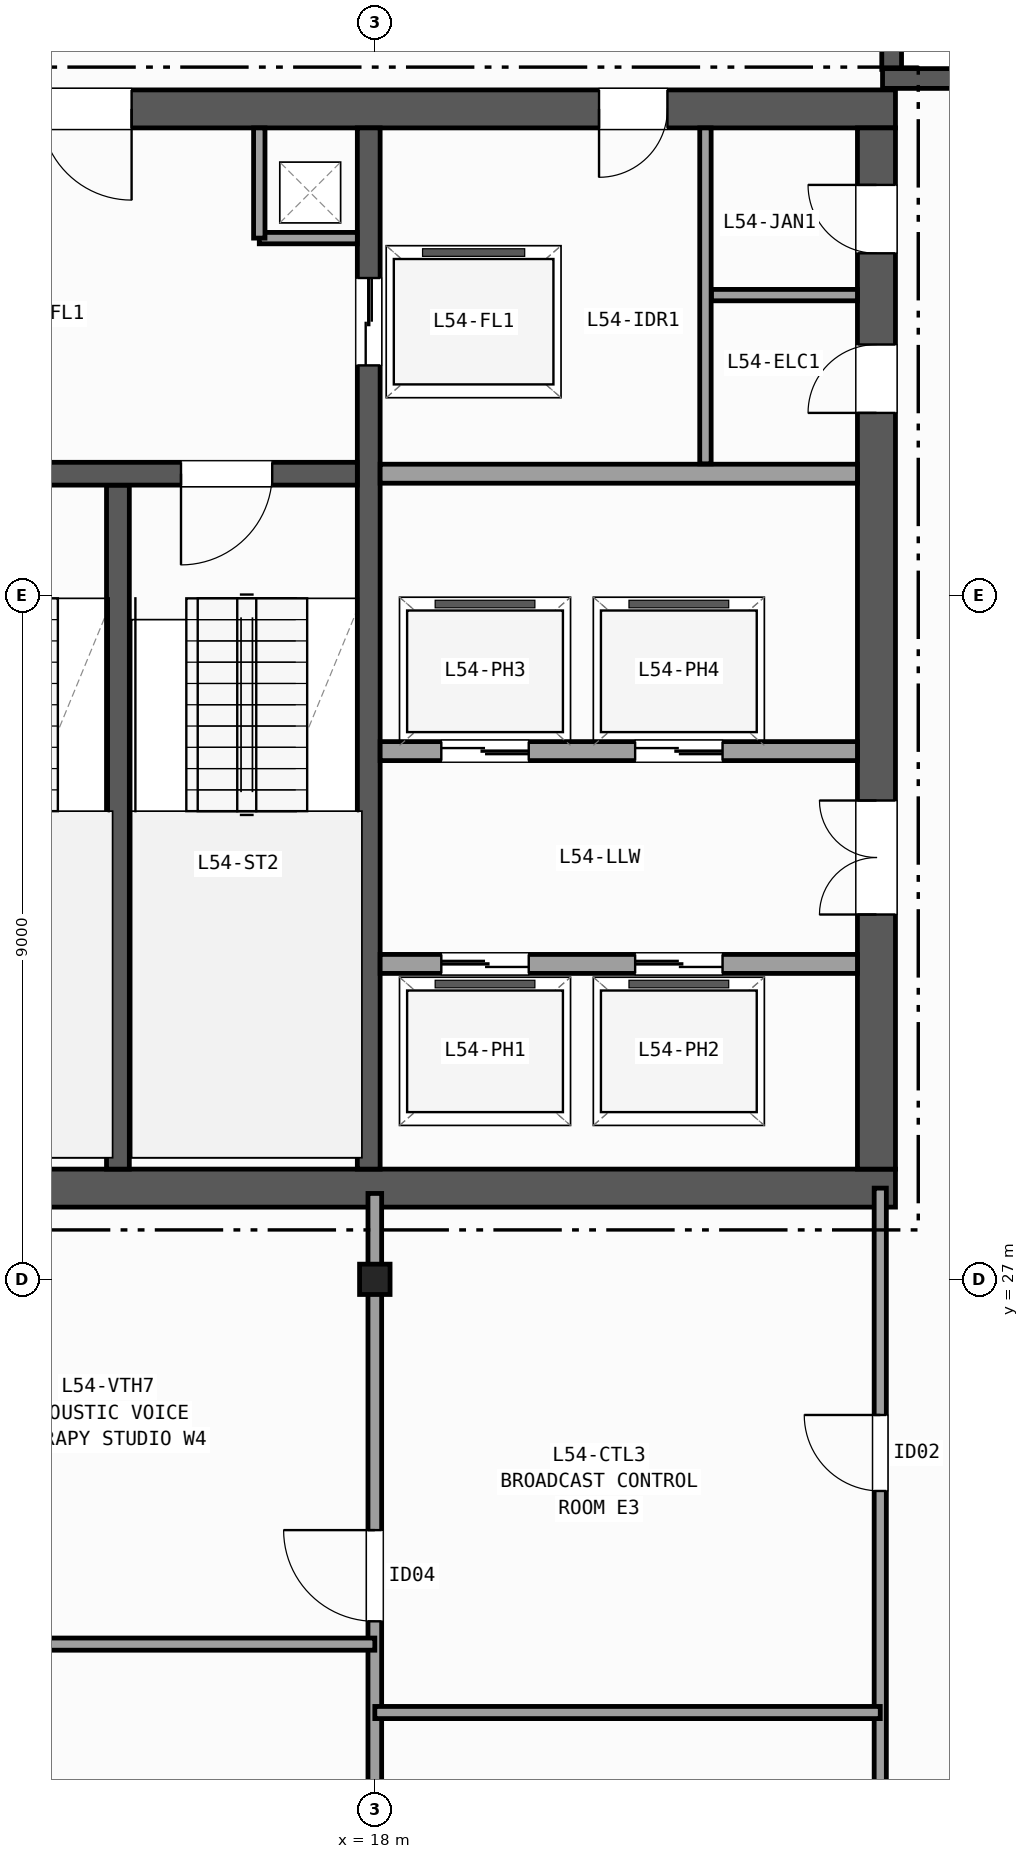
"""IFC4 building model, lengths in metres.
Left out: names, types, materials, properties, quantities, classifications, styles, units other than length and angle.
Written with IfcOpenShell. Run it as: python <this file> out.ifc"""

import sys

from ifc_helpers import new_model, si_unit, direction, frame, frame_2d, origin, origin_2d, place, context, subcontext, project, spatial, rectangle, i_section, extrude, element, fill, save


model = new_model("IFC4")
c1 = context("Model", 3, precision=1e-05, world=origin(), true_north=direction((0.0, 1.0)))
c2 = subcontext(c1, "Body", "Model", "MODEL_VIEW")
j1 = project(units=[si_unit("LENGTHUNIT", "METRE"), si_unit("PLANEANGLEUNIT", "RADIAN")], contexts=[c1])
p1 = place(None, origin())
s1 = spatial("IfcSite", under=j1, at=p1, CompositionType="ELEMENT")
p2 = place(p1, origin())
s2 = spatial("IfcBuilding", under=s1, at=p2, CompositionType="ELEMENT")
p3 = place(p2, frame((0.0, 0.0, 217.3)))
s3 = spatial("IfcBuildingStorey", under=s2, at=p3, CompositionType="ELEMENT", Elevation=217.3)
p4 = place(p3, frame((18.0, 27.0, 0.0), z_axis=(0.0, 0.0, 1.0), x_axis=(1.0, 0.0, 0.0)))
e1 = element("IfcColumn", 1, at=p4, inside=s3, PredefinedType="COLUMN", context=c2, shape_type="SweptSolid", body=[
    extrude(i_section(OverallWidth=0.401, OverallDepth=0.399, WebThickness=0.025, FlangeThickness=0.04, FilletRadius=0.015, at=origin_2d()), origin(), (0.0, 0.0, 1.0), 3.7),
])
p5 = place(p3, frame((24.8, 45.0, 0.0), z_axis=(0.0, 0.0, 1.0), x_axis=(0.0, -1.0, 0.0)))
e2 = element("IfcWall", 2, at=p5, inside=s3, PredefinedType="SOLIDWALL", context=c2, shape_type="SweptSolid", body=[
    extrude(rectangle(XDim=2.08, YDim=0.26, at=frame_2d((1.04, 0.0))), origin(), (0.0, 0.0, 1.0), 3.42),
])
p6 = place(p3, frame((24.68, 42.8, 0.0), z_axis=(0.0, 0.0, 1.0), x_axis=(1.0, 0.0, 0.0)))
e3 = element("IfcWall", 3, at=p6, inside=s3, PredefinedType="SOLIDWALL", context=c2, shape_type="SweptSolid", body=[
    extrude(rectangle(XDim=2.32, YDim=0.26, at=frame_2d((1.16, 0.0))), origin(), (0.0, 0.0, 1.0), 3.42),
])
p7 = place(p3, frame((10.95, 28.2, 0.0), z_axis=(0.0, 0.0, 1.0), x_axis=(1.0, 0.0, 0.0)))
e4 = element("IfcWall", 4, at=p7, inside=s3, PredefinedType="SHEAR", context=c2, shape_type="SweptSolid", body=[
    extrude(rectangle(XDim=13.9, YDim=0.5, at=frame_2d((6.95, 0.0))), origin(), (0.0, 0.0, 1.0), 3.42),
])
p8 = place(p3, frame((24.85, 42.4, 0.0), z_axis=(0.0, 0.0, 1.0), x_axis=(-1.0, 0.0, 0.0)))
e5 = element("IfcWall", 5, at=p8, inside=s3, PredefinedType="SHEAR", context=c2, shape_type="SweptSolid", body=[
    extrude(rectangle(XDim=13.9, YDim=0.5, at=frame_2d((6.95, 0.0))), origin(), (0.0, 0.0, 1.0), 3.42),
])
p9 = place(p8, frame((10.05, 0.0, 0.0)))
e6 = element("IfcOpeningElement", 6, at=p9, cuts=e5, PredefinedType="OPENING", context=c2, shape_type="SweptSolid", body=[
    extrude(rectangle(XDim=1.2, YDim=2.15, at=frame_2d((0.6, 1.075))), frame((0.0, 0.26, 0.0), z_axis=(0.0, -1.0, 0.0), x_axis=(1.0, 0.0, 0.0)), (0.0, 0.0, 1.0), 0.52),
])
p10 = place(p8, frame((3.0, 0.0, 0.0)))
e7 = element("IfcOpeningElement", 7, at=p10, cuts=e5, PredefinedType="OPENING", context=c2, shape_type="SweptSolid", body=[
    extrude(rectangle(XDim=0.9, YDim=2.1, at=frame_2d((0.45, 1.05))), frame((0.0, 0.26, 0.0), z_axis=(0.0, -1.0, 0.0), x_axis=(1.0, 0.0, 0.0)), (0.0, 0.0, 1.0), 0.52),
])
p11 = place(p3, frame((24.6, 28.45, 0.0), z_axis=(0.0, 0.0, 1.0), x_axis=(0.0, 1.0, 0.0)))
e8 = element("IfcWall", 8, at=p11, inside=s3, PredefinedType="SHEAR", context=c2, shape_type="SweptSolid", body=[
    extrude(rectangle(XDim=13.7, YDim=0.5, at=frame_2d((6.85, 0.0))), origin(), (0.0, 0.0, 1.0), 3.42),
])
p12 = place(p11, frame((3.35, 0.0, 0.0)))
e9 = element("IfcOpeningElement", 9, at=p12, cuts=e8, PredefinedType="OPENING", context=c2, shape_type="SweptSolid", body=[
    extrude(rectangle(XDim=1.5, YDim=2.2, at=frame_2d((0.75, 1.1))), frame((0.0, 0.26, 0.0), z_axis=(0.0, -1.0, 0.0), x_axis=(1.0, 0.0, 0.0)), (0.0, 0.0, 1.0), 0.52),
])
p13 = place(p11, frame((9.95, 0.0, 0.0)))
e10 = element("IfcOpeningElement", 10, at=p13, cuts=e8, PredefinedType="OPENING", context=c2, shape_type="SweptSolid", body=[
    extrude(rectangle(XDim=0.9, YDim=2.1, at=frame_2d((0.45, 1.05))), frame((0.0, 0.26, 0.0), z_axis=(0.0, -1.0, 0.0), x_axis=(1.0, 0.0, 0.0)), (0.0, 0.0, 1.0), 0.52),
])
p14 = place(p11, frame((12.05, 0.0, 0.0)))
e11 = element("IfcOpeningElement", 11, at=p14, cuts=e8, PredefinedType="OPENING", context=c2, shape_type="SweptSolid", body=[
    extrude(rectangle(XDim=0.9, YDim=2.1, at=frame_2d((0.45, 1.05))), frame((0.0, 0.26, 0.0), z_axis=(0.0, -1.0, 0.0), x_axis=(1.0, 0.0, 0.0)), (0.0, 0.0, 1.0), 0.52),
])
p15 = place(p3, frame((14.62, 28.45, 0.0), z_axis=(0.0, 0.0, 1.0), x_axis=(0.0, 1.0, 0.0)))
e12 = element("IfcWall", 12, at=p15, inside=s3, PredefinedType="SHEAR", context=c2, shape_type="SweptSolid", body=[
    extrude(rectangle(XDim=9.0, YDim=0.3, at=frame_2d((4.5, 0.0))), origin(), (0.0, 0.0, 1.0), 3.42),
])
p16 = place(p3, frame((17.92, 42.15, 0.0), z_axis=(0.0, 0.0, 1.0), x_axis=(0.0, -1.0, 0.0)))
e13 = element("IfcWall", 13, at=p16, inside=s3, PredefinedType="SHEAR", context=c2, shape_type="SweptSolid", body=[
    extrude(rectangle(XDim=13.7, YDim=0.3, at=frame_2d((6.85, 0.0))), origin(), (0.0, 0.0, 1.0), 3.42),
])
p17 = place(p16, frame((1.975, 0.0, 0.0)))
e14 = element("IfcOpeningElement", 14, at=p17, cuts=e13, PredefinedType="OPENING", context=c2, shape_type="SweptSolid", body=[
    extrude(rectangle(XDim=1.15, YDim=2.15, at=frame_2d((0.575, 1.075))), frame((0.0, 0.16, 0.0), z_axis=(0.0, -1.0, 0.0), x_axis=(1.0, 0.0, 0.0)), (0.0, 0.0, 1.0), 0.32),
])
p18 = place(p3, frame((17.77, 37.6, 0.0), z_axis=(0.0, 0.0, 1.0), x_axis=(-1.0, 0.0, 0.0)))
e15 = element("IfcWall", 15, at=p18, inside=s3, PredefinedType="SHEAR", context=c2, shape_type="SweptSolid", body=[
    extrude(rectangle(XDim=6.32, YDim=0.3, at=frame_2d((3.16, 0.0))), origin(), (0.0, 0.0, 1.0), 3.42),
])
p19 = place(p18, frame((4.22, 0.0, 0.0)))
e16 = element("IfcOpeningElement", 16, at=p19, cuts=e15, PredefinedType="OPENING", context=c2, shape_type="SweptSolid", body=[
    extrude(rectangle(XDim=1.2, YDim=2.15, at=frame_2d((0.6, 1.075))), frame((0.0, 0.16, 0.0), z_axis=(0.0, -1.0, 0.0), x_axis=(1.0, 0.0, 0.0)), (0.0, 0.0, 1.0), 0.32),
])
p20 = place(p18, frame((1.12, 0.0, 0.0)))
e17 = element("IfcOpeningElement", 17, at=p20, cuts=e15, PredefinedType="OPENING", context=c2, shape_type="SweptSolid", body=[
    extrude(rectangle(XDim=1.2, YDim=2.15, at=frame_2d((0.6, 1.075))), frame((0.0, 0.16, 0.0), z_axis=(0.0, -1.0, 0.0), x_axis=(1.0, 0.0, 0.0)), (0.0, 0.0, 1.0), 0.32),
])
p21 = place(p3, frame((16.48, 40.7, 0.0), z_axis=(0.0, 0.0, 1.0), x_axis=(1.0, 0.0, 0.0)))
e18 = element("IfcWall", 18, at=p21, inside=s3, PredefinedType="PARTITIONING", context=c2, shape_type="SweptSolid", body=[
    extrude(rectangle(XDim=1.29, YDim=0.15, at=frame_2d((0.645, 0.0))), origin(), (0.0, 0.0, 1.0), 3.42),
])
p22 = place(p3, frame((16.48, 40.7, 0.0), z_axis=(0.0, 0.0, 1.0), x_axis=(0.0, 1.0, 0.0)))
e19 = element("IfcWall", 19, at=p22, inside=s3, PredefinedType="PARTITIONING", context=c2, shape_type="SweptSolid", body=[
    extrude(rectangle(XDim=1.45, YDim=0.15, at=frame_2d((0.725, 0.0))), origin(), (0.0, 0.0, 1.0), 3.42),
])
p23 = place(p3, frame((18.07, 37.6, 0.0), z_axis=(0.0, 0.0, 1.0), x_axis=(1.0, 0.0, 0.0)))
e20 = element("IfcWall", 20, at=p23, inside=s3, PredefinedType="PARTITIONING", context=c2, shape_type="SweptSolid", body=[
    extrude(rectangle(XDim=6.28, YDim=0.25, at=frame_2d((3.14, 0.0))), origin(), (0.0, 0.0, 1.0), 3.42),
])
p24 = place(p3, frame((18.07, 31.15, 0.0), z_axis=(0.0, 0.0, 1.0), x_axis=(1.0, 0.0, 0.0)))
e21 = element("IfcWall", 21, at=p24, inside=s3, PredefinedType="PARTITIONING", context=c2, shape_type="SweptSolid", body=[
    extrude(rectangle(XDim=6.28, YDim=0.25, at=frame_2d((3.14, 0.0))), origin(), (0.0, 0.0, 1.0), 3.42),
])
p25 = place(p24, frame((0.805, 0.0, 0.0)))
e22 = element("IfcOpeningElement", 22, at=p25, cuts=e21, PredefinedType="OPENING", context=c2, shape_type="SweptSolid", body=[
    extrude(rectangle(XDim=1.15, YDim=2.15, at=frame_2d((0.575, 1.075))), frame((0.0, 0.135, 0.0), z_axis=(0.0, -1.0, 0.0), x_axis=(1.0, 0.0, 0.0)), (0.0, 0.0, 1.0), 0.27),
])
p26 = place(p24, frame((3.355, 0.0, 0.0)))
e23 = element("IfcOpeningElement", 23, at=p26, cuts=e21, PredefinedType="OPENING", context=c2, shape_type="SweptSolid", body=[
    extrude(rectangle(XDim=1.15, YDim=2.15, at=frame_2d((0.575, 1.075))), frame((0.0, 0.135, 0.0), z_axis=(0.0, -1.0, 0.0), x_axis=(1.0, 0.0, 0.0)), (0.0, 0.0, 1.0), 0.27),
])
p27 = place(p3, frame((24.35, 33.95, 0.0), z_axis=(0.0, 0.0, 1.0), x_axis=(-1.0, 0.0, 0.0)))
e24 = element("IfcWall", 24, at=p27, inside=s3, PredefinedType="PARTITIONING", context=c2, shape_type="SweptSolid", body=[
    extrude(rectangle(XDim=6.28, YDim=0.25, at=frame_2d((3.14, 0.0))), origin(), (0.0, 0.0, 1.0), 3.42),
])
p28 = place(p27, frame((4.325, 0.0, 0.0)))
e25 = element("IfcOpeningElement", 25, at=p28, cuts=e24, PredefinedType="OPENING", context=c2, shape_type="SweptSolid", body=[
    extrude(rectangle(XDim=1.15, YDim=2.15, at=frame_2d((0.575, 1.075))), frame((0.0, 0.135, 0.0), z_axis=(0.0, -1.0, 0.0), x_axis=(1.0, 0.0, 0.0)), (0.0, 0.0, 1.0), 0.27),
])
p29 = place(p27, frame((1.775, 0.0, 0.0)))
e26 = element("IfcOpeningElement", 26, at=p29, cuts=e24, PredefinedType="OPENING", context=c2, shape_type="SweptSolid", body=[
    extrude(rectangle(XDim=1.15, YDim=2.15, at=frame_2d((0.575, 1.075))), frame((0.0, 0.135, 0.0), z_axis=(0.0, -1.0, 0.0), x_axis=(1.0, 0.0, 0.0)), (0.0, 0.0, 1.0), 0.27),
])
p30 = place(p3, frame((22.35, 37.73, 0.0), z_axis=(0.0, 0.0, 1.0), x_axis=(0.0, 1.0, 0.0)))
e27 = element("IfcWall", 27, at=p30, inside=s3, PredefinedType="PARTITIONING", context=c2, shape_type="SweptSolid", body=[
    extrude(rectangle(XDim=4.42, YDim=0.15, at=frame_2d((2.21, 0.0))), origin(), (0.0, 0.0, 1.0), 3.42),
])
p31 = place(p3, frame((22.43, 39.95, 0.0), z_axis=(0.0, 0.0, 1.0), x_axis=(1.0, 0.0, 0.0)))
e28 = element("IfcWall", 28, at=p31, inside=s3, PredefinedType="PARTITIONING", context=c2, shape_type="SweptSolid", body=[
    extrude(rectangle(XDim=1.92, YDim=0.15, at=frame_2d((0.96, 0.0))), origin(), (0.0, 0.0, 1.0), 3.42),
])
p32 = place(p3, frame((24.65, 9.0, 0.0), z_axis=(0.0, 0.0, 1.0), x_axis=(0.0, 1.0, 0.0)))
e29 = element("IfcWall", 29, at=p32, inside=s3, PredefinedType="PARTITIONING", context=c2, shape_type="SweptSolid", body=[
    extrude(rectangle(XDim=19.2, YDim=0.16, at=frame_2d((9.6, 0.0))), origin(), (0.0, 0.0, 1.0), 2.707),
])
p33 = place(p32, frame((2.8, 0.0, 0.0)))
e30 = element("IfcOpeningElement", 30, at=p33, cuts=e29, PredefinedType="OPENING", context=c2, shape_type="SweptSolid", body=[
    extrude(rectangle(XDim=0.86, YDim=2.05, at=frame_2d((0.43, 1.025))), frame((0.0, 0.09, 0.0), z_axis=(0.0, -1.0, 0.0), x_axis=(1.0, 0.0, 0.0)), (0.0, 0.0, 1.0), 0.18),
])
p34 = place(p32, frame((8.95, 0.0, 0.0)))
e31 = element("IfcOpeningElement", 31, at=p34, cuts=e29, PredefinedType="OPENING", context=c2, shape_type="SweptSolid", body=[
    extrude(rectangle(XDim=0.95, YDim=2.1, at=frame_2d((0.475, 1.05))), frame((0.0, 0.09, 0.0), z_axis=(0.0, -1.0, 0.0), x_axis=(1.0, 0.0, 0.0)), (0.0, 0.0, 1.0), 0.18),
])
p35 = place(p32, frame((15.215, 0.0, 0.0)))
e32 = element("IfcOpeningElement", 32, at=p35, cuts=e29, PredefinedType="OPENING", context=c2, shape_type="SweptSolid", body=[
    extrude(rectangle(XDim=1.0, YDim=2.1, at=frame_2d((0.5, 1.05))), frame((0.0, 0.09, 0.0), z_axis=(0.0, -1.0, 0.0), x_axis=(1.0, 0.0, 0.0)), (0.0, 0.0, 1.0), 0.18),
])
p36 = place(p3, frame((18.0, 9.0, 0.0), z_axis=(0.0, 0.0, 1.0), x_axis=(0.0, 1.0, 0.0)))
e33 = element("IfcWall", 33, at=p36, inside=s3, PredefinedType="PARTITIONING", context=c2, shape_type="SweptSolid", body=[
    extrude(rectangle(XDim=19.13, YDim=0.18, at=frame_2d((9.565, 0.0))), origin(), (0.0, 0.0, 1.0), 2.707),
])
p37 = place(p36, frame((2.2, 0.0, 0.0)))
e34 = element("IfcOpeningElement", 34, at=p37, cuts=e33, PredefinedType="OPENING", context=c2, shape_type="SweptSolid", body=[
    extrude(rectangle(XDim=1.05, YDim=2.15, at=frame_2d((0.525, 1.075))), frame((0.0, 0.1, 0.0), z_axis=(0.0, -1.0, 0.0), x_axis=(1.0, 0.0, 0.0)), (0.0, 0.0, 1.0), 0.2),
])
p38 = place(p36, frame((13.5, 0.0, 0.0)))
e35 = element("IfcOpeningElement", 35, at=p38, cuts=e33, PredefinedType="OPENING", context=c2, shape_type="SweptSolid", body=[
    extrude(rectangle(XDim=1.2, YDim=2.15, at=frame_2d((0.6, 1.075))), frame((0.0, 0.1, 0.0), z_axis=(0.0, -1.0, 0.0), x_axis=(1.0, 0.0, 0.0)), (0.0, 0.0, 1.0), 0.2),
])
p39 = place(p3, frame((18.0, 21.3, 0.0), z_axis=(0.0, 0.0, 1.0), x_axis=(1.0, 0.0, 0.0)))
e36 = element("IfcWall", 36, at=p39, inside=s3, PredefinedType="PARTITIONING", context=c2, shape_type="SweptSolid", body=[
    extrude(rectangle(XDim=6.65, YDim=0.16, at=frame_2d((3.325, 0.0))), origin(), (0.0, 0.0, 1.0), 2.792),
])
p40 = place(p3, frame((9.0, 22.2, 0.0), z_axis=(0.0, 0.0, 1.0), x_axis=(1.0, 0.0, 0.0)))
e37 = element("IfcWall", 37, at=p40, inside=s3, PredefinedType="PARTITIONING", context=c2, shape_type="SweptSolid", body=[
    extrude(rectangle(XDim=9.0, YDim=0.16, at=frame_2d((4.5, 0.0))), origin(), (0.0, 0.0, 1.0), 2.707),
])
p41 = place(p40, frame((3.5, 0.0, 0.0)))
e38 = element("IfcOpeningElement", 38, at=p41, cuts=e37, PredefinedType="OPENING", context=c2, shape_type="SweptSolid", body=[
    extrude(rectangle(XDim=1.0, YDim=2.1, at=frame_2d((0.5, 1.05))), frame((0.0, 0.09, 0.0), z_axis=(0.0, -1.0, 0.0), x_axis=(1.0, 0.0, 0.0)), (0.0, 0.0, 1.0), 0.18),
])
p42 = place(p20, origin())
e39 = element("IfcDoor", 39, at=p42, inside=s3, OperationType="SINGLE_SWING_RIGHT", PredefinedType="DOOR", context=c2, shape_type="SweptSolid", body=[
    extrude(rectangle(XDim=1.2, YDim=2.15, at=frame_2d((0.6, 1.075))), frame((0.0, 0.025, 0.0), z_axis=(0.0, -1.0, 0.0), x_axis=(1.0, 0.0, 0.0)), (0.0, 0.0, 1.0), 0.05),
])
fill(e17, e39)
p43 = place(p12, origin())
e40 = element("IfcDoor", 40, at=p43, inside=s3, OperationType="DOUBLE_DOOR_SINGLE_SWING", PredefinedType="DOOR", context=c2, shape_type="SweptSolid", body=[
    extrude(rectangle(XDim=1.5, YDim=2.2, at=frame_2d((0.75, 1.1))), frame((0.0, 0.025, 0.0), z_axis=(0.0, -1.0, 0.0), x_axis=(1.0, 0.0, 0.0)), (0.0, 0.0, 1.0), 0.05),
])
fill(e9, e40)
p44 = place(p9, origin())
e41 = element("IfcDoor", 41, at=p44, inside=s3, OperationType="SINGLE_SWING_LEFT", PredefinedType="DOOR", context=c2, shape_type="SweptSolid", body=[
    extrude(rectangle(XDim=1.2, YDim=2.15, at=frame_2d((0.6, 1.075))), frame((0.0, 0.025, 0.0), z_axis=(0.0, -1.0, 0.0), x_axis=(1.0, 0.0, 0.0)), (0.0, 0.0, 1.0), 0.05),
])
fill(e6, e41)
p45 = place(p13, origin())
e42 = element("IfcDoor", 42, at=p45, inside=s3, OperationType="SINGLE_SWING_LEFT", PredefinedType="DOOR", context=c2, shape_type="SweptSolid", body=[
    extrude(rectangle(XDim=0.9, YDim=2.1, at=frame_2d((0.45, 1.05))), frame((0.0, 0.025, 0.0), z_axis=(0.0, -1.0, 0.0), x_axis=(1.0, 0.0, 0.0)), (0.0, 0.0, 1.0), 0.05),
])
fill(e10, e42)
p46 = place(p10, origin())
e43 = element("IfcDoor", 43, at=p46, inside=s3, OperationType="SINGLE_SWING_RIGHT", PredefinedType="DOOR", context=c2, shape_type="SweptSolid", body=[
    extrude(rectangle(XDim=0.9, YDim=2.1, at=frame_2d((0.45, 1.05))), frame((0.0, 0.025, 0.0), z_axis=(0.0, -1.0, 0.0), x_axis=(1.0, 0.0, 0.0)), (0.0, 0.0, 1.0), 0.05),
])
fill(e7, e43)
p47 = place(p14, origin())
e44 = element("IfcDoor", 44, at=p47, inside=s3, OperationType="SINGLE_SWING_RIGHT", PredefinedType="DOOR", context=c2, shape_type="SweptSolid", body=[
    extrude(rectangle(XDim=0.9, YDim=2.1, at=frame_2d((0.45, 1.05))), frame((0.0, 0.025, 0.0), z_axis=(0.0, -1.0, 0.0), x_axis=(1.0, 0.0, 0.0)), (0.0, 0.0, 1.0), 0.05),
])
fill(e11, e44)
p48 = place(p17, origin())
e45 = element("IfcDoor", 45, at=p48, inside=s3, OperationType="DOUBLE_DOOR_SLIDING", PredefinedType="DOOR", context=c2, shape_type="SweptSolid", body=[
    extrude(rectangle(XDim=1.15, YDim=2.15, at=frame_2d((0.575, 1.075))), frame((0.0, 0.025, 0.0), z_axis=(0.0, -1.0, 0.0), x_axis=(1.0, 0.0, 0.0)), (0.0, 0.0, 1.0), 0.05),
])
fill(e14, e45)
p49 = place(p25, origin())
e46 = element("IfcDoor", 46, at=p49, inside=s3, OperationType="DOUBLE_DOOR_SLIDING", PredefinedType="DOOR", context=c2, shape_type="SweptSolid", body=[
    extrude(rectangle(XDim=1.15, YDim=2.15, at=frame_2d((0.575, 1.075))), frame((0.0, 0.025, 0.0), z_axis=(0.0, -1.0, 0.0), x_axis=(1.0, 0.0, 0.0)), (0.0, 0.0, 1.0), 0.05),
])
fill(e22, e46)
p50 = place(p26, origin())
e47 = element("IfcDoor", 47, at=p50, inside=s3, OperationType="DOUBLE_DOOR_SLIDING", PredefinedType="DOOR", context=c2, shape_type="SweptSolid", body=[
    extrude(rectangle(XDim=1.15, YDim=2.15, at=frame_2d((0.575, 1.075))), frame((0.0, 0.025, 0.0), z_axis=(0.0, -1.0, 0.0), x_axis=(1.0, 0.0, 0.0)), (0.0, 0.0, 1.0), 0.05),
])
fill(e23, e47)
p51 = place(p28, origin())
e48 = element("IfcDoor", 48, at=p51, inside=s3, OperationType="DOUBLE_DOOR_SLIDING", PredefinedType="DOOR", context=c2, shape_type="SweptSolid", body=[
    extrude(rectangle(XDim=1.15, YDim=2.15, at=frame_2d((0.575, 1.075))), frame((0.0, 0.025, 0.0), z_axis=(0.0, -1.0, 0.0), x_axis=(1.0, 0.0, 0.0)), (0.0, 0.0, 1.0), 0.05),
])
fill(e25, e48)
p52 = place(p29, origin())
e49 = element("IfcDoor", 49, at=p52, inside=s3, OperationType="DOUBLE_DOOR_SLIDING", PredefinedType="DOOR", context=c2, shape_type="SweptSolid", body=[
    extrude(rectangle(XDim=1.15, YDim=2.15, at=frame_2d((0.575, 1.075))), frame((0.0, 0.025, 0.0), z_axis=(0.0, -1.0, 0.0), x_axis=(1.0, 0.0, 0.0)), (0.0, 0.0, 1.0), 0.05),
])
fill(e26, e49)
p53 = place(p35, origin())
e50 = element("IfcDoor", 50, at=p53, inside=s3, OperationType="SINGLE_SWING_RIGHT", PredefinedType="DOOR", context=c2, shape_type="SweptSolid", body=[
    extrude(rectangle(XDim=1.0, YDim=2.1, at=frame_2d((0.5, 1.05))), frame((0.0, 0.025, 0.0), z_axis=(0.0, -1.0, 0.0), x_axis=(1.0, 0.0, 0.0)), (0.0, 0.0, 1.0), 0.05),
])
fill(e32, e50)
p54 = place(p38, origin())
e51 = element("IfcDoor", 51, at=p54, inside=s3, OperationType="SINGLE_SWING_RIGHT", PredefinedType="DOOR", context=c2, shape_type="SweptSolid", body=[
    extrude(rectangle(XDim=1.2, YDim=2.15, at=frame_2d((0.6, 1.075))), frame((0.0, 0.025, 0.0), z_axis=(0.0, -1.0, 0.0), x_axis=(1.0, 0.0, 0.0)), (0.0, 0.0, 1.0), 0.05),
])
fill(e35, e51)
save(model, sys.argv[1])
